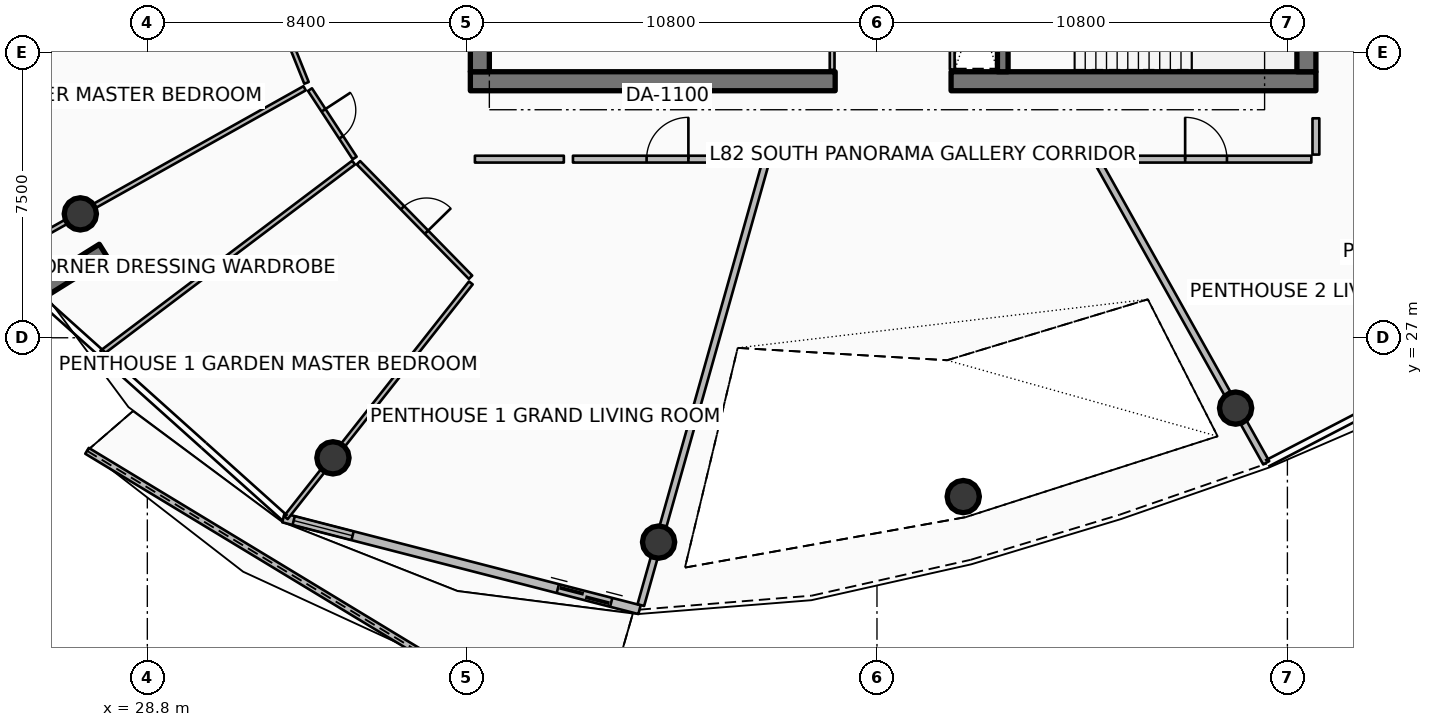
"""IFC4 building model, lengths in metres.
Left out: names, types, materials, properties, quantities, classifications, styles, units other than length and angle.
Written with IfcOpenShell. Run it as: python <this file> out.ifc"""

import sys

from ifc_helpers import new_model, si_unit, direction, frame, frame_2d, origin, origin_2d, place, context, subcontext, project, spatial, polyline, rectangle, circle, outline, extrude, element, fill, save


model = new_model("IFC4")
c1 = context("Model", 3, precision=1e-05, world=origin(), true_north=direction((0.0, 1.0)))
c2 = subcontext(c1, "Body", "Model", "MODEL_VIEW")
j1 = project(units=[si_unit("LENGTHUNIT", "METRE"), si_unit("PLANEANGLEUNIT", "RADIAN")], contexts=[c1])
p1 = place(None, origin())
s1 = spatial("IfcSite", under=j1, at=p1, CompositionType="ELEMENT")
p2 = place(p1, origin())
s2 = spatial("IfcBuilding", under=s1, at=p2, CompositionType="ELEMENT")
p3 = place(p2, frame((0.0, 0.0, 326.3)))
s3 = spatial("IfcBuildingStorey", under=s2, at=p3, CompositionType="ELEMENT", Elevation=326.3)
p4 = place(p3, frame((37.3, 33.75, 0.0), z_axis=(0.0, 0.0, 1.0), x_axis=(1.0, 0.0, 0.0)))
e1 = element("IfcWall", 1, at=p4, inside=s3, PredefinedType="SHEAR", context=c2, shape_type="SweptSolid", body=[
    extrude(rectangle(XDim=9.6, YDim=0.5, at=frame_2d((4.8, 0.0))), origin(), (0.0, 0.0, 1.0), 4.2),
])
p5 = place(p3, frame((49.95, 33.75, 0.0), z_axis=(0.0, 0.0, 1.0), x_axis=(1.0, 0.0, 0.0)))
e2 = element("IfcWall", 2, at=p5, inside=s3, PredefinedType="SHEAR", context=c2, shape_type="SweptSolid", body=[
    extrude(rectangle(XDim=9.6, YDim=0.5, at=frame_2d((4.8, 0.0))), origin(), (0.0, 0.0, 1.0), 4.2),
])
for number, where, z_axis, x_axis in (
    (3, (37.55, 34.0, 0.0), (0.0, 0.0, 1.0), (0.0, 1.0, 0.0)),
    (4, (59.3, 34.0, 0.0), (0.0, 0.0, 1.0), (0.0, 1.0, 0.0)),
):
    element("IfcWall", number, at=place(p3, frame(where, z_axis=z_axis, x_axis=x_axis)), inside=s3, PredefinedType="SHEAR", context=c2, shape_type="SweptSolid", body=[
        extrude(rectangle(XDim=16.0, YDim=0.5, at=frame_2d((8.0, 0.0))), origin(), (0.0, 0.0, 1.0), 4.2),
    ])
p6 = place(p3, frame((51.31, 34.0, 0.0), z_axis=(0.0, 0.0, 1.0), x_axis=(0.0, 1.0, 0.0)))
e5 = element("IfcWall", 5, at=p6, inside=s3, PredefinedType="SHEAR", context=c2, shape_type="SweptSolid", body=[
    extrude(rectangle(XDim=3.5, YDim=0.28, at=frame_2d((1.75, 0.0))), origin(), (0.0, 0.0, 1.0), 4.2),
])
p7 = place(p3, frame((27.647, 29.282, 0.0), z_axis=(0.0, 0.0, 1.0), x_axis=(-0.848053161125, -0.529911158502, 0.0)))
e6 = element("IfcWall", 6, at=p7, inside=s3, PredefinedType="SOLIDWALL", context=c2, shape_type="SweptSolid", body=[
    extrude(rectangle(XDim=3.5, YDim=0.42, at=frame_2d((1.75, 0.0))), origin(), (0.0, 0.0, 1.0), 4.2),
])
for number, where, z_axis, x_axis in (
    (7, (27.037, 30.26, 0.0), (0.0, 0.0, 1.0), (1.0, 0.0, 0.0)),
    (8, (33.684, 23.841, 0.0), (0.0, 0.0, 1.0), (1.0, 0.0, 0.0)),
    (9, (42.253, 21.624, 0.0), (0.0, 0.0, 1.0), (1.0, 0.0, 0.0)),
):
    element("IfcColumn", number, at=place(p3, frame(where, z_axis=z_axis, x_axis=x_axis)), inside=s3, PredefinedType="COLUMN", context=c2, shape_type="SweptSolid", body=[
        extrude(circle(Radius=0.425, at=origin_2d()), origin(), (0.0, 0.0, 1.0), 3.94),
    ])
p8 = place(p3, frame((50.27, 22.821, 0.0), z_axis=(0.0, 0.0, 1.0), x_axis=(1.0, 0.0, 0.0)))
e10 = element("IfcColumn", 10, at=p8, inside=s3, PredefinedType="COLUMN", context=c2, shape_type="SweptSolid", body=[
    extrude(circle(Radius=0.425, at=origin_2d()), origin(), (0.0, 0.0, 1.0), 4.196),
])
p9 = place(p3, frame((57.437, 25.149, 0.0), z_axis=(0.0, 0.0, 1.0), x_axis=(1.0, 0.0, 0.0)))
e11 = element("IfcColumn", 11, at=p9, inside=s3, PredefinedType="COLUMN", context=c2, shape_type="SweptSolid", body=[
    extrude(circle(Radius=0.425, at=origin_2d()), origin(), (0.0, 0.0, 1.0), 3.94),
])
p10 = place(p3, frame((27.213, 24.026, 0.0), z_axis=(0.0, 0.0, 1.0), x_axis=(0.855326815189, -0.518088833327, 0.0)))
e12 = element("IfcWall", 12, at=p10, inside=s3, PredefinedType="PARAPET", context=c2, shape_type="SweptSolid", body=[
    extrude(outline(polyline([(0.0, 0.0), (10.269, 0.0), (10.269, 1.348), (5.135, 1.182), (0.0, 1.12), (0.0, 0.0)])), frame((0.0, 0.09, 0.0), z_axis=(0.0, -1.0, 0.0), x_axis=(1.0, 0.0, 0.0)), (0.0, 0.0, 1.0), 0.18),
])
p11 = place(p3, frame((32.38, 22.26, 0.0), z_axis=(0.0, 0.0, 1.0), x_axis=(0.968389062354, -0.249444630957, 0.0)))
e13 = element("IfcWall", 13, at=p11, inside=s3, PredefinedType="SOLIDWALL", context=c2, shape_type="SweptSolid", body=[
    extrude(rectangle(XDim=9.678, YDim=0.24, at=frame_2d((4.839, 0.0))), origin(), (0.0, 0.0, 1.0), 2.89),
])
p12 = place(p11, frame((7.458, 0.0, 0.0)))
e14 = element("IfcOpeningElement", 14, at=p12, cuts=e13, PredefinedType="OPENING", context=c2, shape_type="SweptSolid", body=[
    extrude(rectangle(XDim=1.45, YDim=2.15, at=frame_2d((0.725, 1.075))), frame((0.0, 0.13, 0.0), z_axis=(0.0, -1.0, 0.0), x_axis=(1.0, 0.0, 0.0)), (0.0, 0.0, 1.0), 0.26),
])
p13 = place(p11, frame((0.28, 0.0, 0.65)))
e15 = element("IfcOpeningElement", 15, at=p13, cuts=e13, PredefinedType="OPENING", context=c2, shape_type="SweptSolid", body=[
    extrude(rectangle(XDim=1.6, YDim=1.5, at=frame_2d((0.8, 0.75))), frame((0.0, 0.13, 0.0), z_axis=(0.0, -1.0, 0.0), x_axis=(1.0, 0.0, 0.0)), (0.0, 0.0, 1.0), 0.26),
])
p14 = place(p3, frame((46.82, 34.05, 0.0), z_axis=(0.0, 0.0, 1.0), x_axis=(0.0, 1.0, 0.0)))
e16 = element("IfcWall", 16, at=p14, inside=s3, PredefinedType="PARTITIONING", context=c2, shape_type="SweptSolid", body=[
    extrude(rectangle(XDim=2.03, YDim=0.125, at=frame_2d((1.015, 0.0))), origin(), (0.0, 0.0, 1.0), 3.38),
])
p15 = place(p3, frame((49.98, 34.06, 0.0), z_axis=(0.0, 0.0, 1.0), x_axis=(0.0, 1.0, 0.0)))
e17 = element("IfcWall", 17, at=p15, inside=s3, PredefinedType="PARTITIONING", context=c2, shape_type="SweptSolid", body=[
    extrude(rectangle(XDim=3.4, YDim=0.125, at=frame_2d((1.7, 0.0))), origin(), (0.0, 0.0, 1.0), 3.38),
])
p16 = place(p3, frame((45.165, 31.7, 0.0), z_axis=(0.0, 0.0, 1.0), x_axis=(1.0, 0.0, 0.0)))
e18 = element("IfcWall", 18, at=p16, inside=s3, PredefinedType="SOLIDWALL", context=c2, shape_type="SweptSolid", body=[
    extrude(rectangle(XDim=8.533, YDim=0.24, at=frame_2d((4.267, 0.0))), origin(), (0.0, 0.0, 1.0), 3.38),
])
p17 = place(p3, frame((45.095, 31.7, 0.0), z_axis=(0.0, 0.0, 1.0), x_axis=(-0.271453030279, -0.962451688321, 0.0)))
e19 = element("IfcWall", 19, at=p17, inside=s3, PredefinedType="PARTITIONING", context=c2, shape_type="SweptSolid", body=[
    extrude(rectangle(XDim=12.191, YDim=0.18, at=frame_2d((6.096, 0.0))), origin(), (0.0, 0.0, 1.0), 3.38),
])
p18 = place(p3, frame((53.768, 31.7, 0.0), z_axis=(0.0, 0.0, 1.0), x_axis=(0.488623665245, -0.872494649704, 0.0)))
e20 = element("IfcWall", 20, at=p18, inside=s3, PredefinedType="PARTITIONING", context=c2, shape_type="SweptSolid", body=[
    extrude(rectangle(XDim=9.157, YDim=0.18, at=frame_2d((4.579, 0.0))), origin(), (0.0, 0.0, 1.0), 3.38),
])
p19 = place(p3, frame((40.0, 31.7, 0.0), z_axis=(0.0, 0.0, 1.0), x_axis=(1.0, 0.0, 0.0)))
e21 = element("IfcWall", 21, at=p19, inside=s3, PredefinedType="PARTITIONING", context=c2, shape_type="SweptSolid", body=[
    extrude(rectangle(XDim=4.975, YDim=0.18, at=frame_2d((2.488, 0.0))), origin(), (0.0, 0.0, 1.0), 3.38),
])
p20 = place(p19, frame((1.938, 0.0, 0.0)))
e22 = element("IfcOpeningElement", 22, at=p20, cuts=e21, PredefinedType="OPENING", context=c2, shape_type="SweptSolid", body=[
    extrude(rectangle(XDim=1.1, YDim=2.1, at=frame_2d((0.55, 1.05))), frame((0.0, 0.1, 0.0), z_axis=(0.0, -1.0, 0.0), x_axis=(1.0, 0.0, 0.0)), (0.0, 0.0, 1.0), 0.2),
])
p21 = place(p3, frame((31.416, 37.618, 0.0), z_axis=(0.0, 0.0, 1.0), x_axis=(0.37287786912, -0.927880431263, 0.0)))
e23 = element("IfcWall", 23, at=p21, inside=s3, PredefinedType="PARTITIONING", context=c2, shape_type="SweptSolid", body=[
    extrude(rectangle(XDim=4.216, YDim=0.125, at=frame_2d((2.108, 0.0))), origin(), (0.0, 0.0, 1.0), 3.38),
])
p22 = place(p21, frame((1.658, 0.0, 0.0)))
e24 = element("IfcOpeningElement", 24, at=p22, cuts=e23, PredefinedType="OPENING", context=c2, shape_type="SweptSolid", body=[
    extrude(rectangle(XDim=0.9, YDim=2.08, at=frame_2d((0.45, 1.04))), frame((0.0, 0.073, 0.0), z_axis=(0.0, -1.0, 0.0), x_axis=(1.0, 0.0, 0.0)), (0.0, 0.0, 1.0), 0.145),
])
p23 = place(p3, frame((37.42, 31.7, 0.0), z_axis=(0.0, 0.0, 1.0), x_axis=(1.0, 0.0, 0.0)))
e25 = element("IfcWall", 25, at=p23, inside=s3, PredefinedType="PARTITIONING", context=c2, shape_type="SweptSolid", body=[
    extrude(rectangle(XDim=2.34, YDim=0.18, at=frame_2d((1.17, 0.0))), origin(), (0.0, 0.0, 1.0), 3.38),
])
p24 = place(p3, frame((32.938, 33.565, 0.0), z_axis=(0.0, 0.0, 1.0), x_axis=(-0.87250261652, -0.488609439293, 0.0)))
e26 = element("IfcWall", 26, at=p24, inside=s3, PredefinedType="PARTITIONING", context=c2, shape_type="SweptSolid", body=[
    extrude(rectangle(XDim=8.573, YDim=0.125, at=frame_2d((4.286, 0.0))), origin(), (0.0, 0.0, 1.0), 3.38),
])
p25 = place(p3, frame((37.312, 28.443, 0.0), z_axis=(0.0, 0.0, 1.0), x_axis=(-0.619079427556, -0.78532837869, 0.0)))
e27 = element("IfcWall", 27, at=p25, inside=s3, PredefinedType="PARTITIONING", context=c2, shape_type="SweptSolid", body=[
    extrude(rectangle(XDim=7.864, YDim=0.125, at=frame_2d((3.932, 0.0))), origin(), (0.0, 0.0, 1.0), 3.38),
])
p26 = place(p3, frame((34.228, 31.608, 0.0), z_axis=(0.0, 0.0, 1.0), x_axis=(-0.798277484709, -0.602289845014, 0.0)))
e28 = element("IfcWall", 28, at=p26, inside=s3, PredefinedType="PARTITIONING", context=c2, shape_type="SweptSolid", body=[
    extrude(rectangle(XDim=8.299, YDim=0.125, at=frame_2d((4.149, 0.0))), origin(), (0.0, 0.0, 1.0), 3.38),
])
p27 = place(p3, frame((33.08, 33.53, 0.0), z_axis=(0.0, 0.0, 1.0), x_axis=(0.546735291737, -0.837305512205, 0.0)))
e29 = element("IfcWall", 29, at=p27, inside=s3, PredefinedType="PARTITIONING", context=c2, shape_type="SweptSolid", body=[
    extrude(rectangle(XDim=2.15, YDim=0.125, at=frame_2d((1.075, 0.0))), origin(), (0.0, 0.0, 1.0), 3.38),
])
p28 = place(p27, frame((0.65, 0.0, 0.0)))
e30 = element("IfcOpeningElement", 30, at=p28, cuts=e29, PredefinedType="OPENING", context=c2, shape_type="SweptSolid", body=[
    extrude(rectangle(XDim=0.85, YDim=2.06, at=frame_2d((0.425, 1.03))), frame((0.0, 0.073, 0.0), z_axis=(0.0, -1.0, 0.0), x_axis=(1.0, 0.0, 0.0)), (0.0, 0.0, 1.0), 0.145),
])
p29 = place(p3, frame((34.355, 31.605, 0.0), z_axis=(0.0, 0.0, 1.0), x_axis=(0.699567507915, -0.714566513258, 0.0)))
e31 = element("IfcWall", 31, at=p29, inside=s3, PredefinedType="PARTITIONING", context=c2, shape_type="SweptSolid", body=[
    extrude(rectangle(XDim=4.216, YDim=0.125, at=frame_2d((2.108, 0.0))), origin(), (0.0, 0.0, 1.0), 3.38),
])
p30 = place(p29, frame((1.658, 0.0, 0.0)))
e32 = element("IfcOpeningElement", 32, at=p30, cuts=e31, PredefinedType="OPENING", context=c2, shape_type="SweptSolid", body=[
    extrude(rectangle(XDim=0.9, YDim=2.08, at=frame_2d((0.45, 1.04))), frame((0.0, 0.073, 0.0), z_axis=(0.0, -1.0, 0.0), x_axis=(1.0, 0.0, 0.0)), (0.0, 0.0, 1.0), 0.145),
])
p31 = place(p3, frame((53.888, 31.7, 0.0), z_axis=(0.0, 0.0, 1.0), x_axis=(1.0, 0.0, 0.0)))
e33 = element("IfcWall", 33, at=p31, inside=s3, PredefinedType="PARTITIONING", context=c2, shape_type="SweptSolid", body=[
    extrude(rectangle(XDim=5.542, YDim=0.18, at=frame_2d((2.771, 0.0))), origin(), (0.0, 0.0, 1.0), 3.38),
])
p32 = place(p31, frame((2.221, 0.0, 0.0)))
e34 = element("IfcOpeningElement", 34, at=p32, cuts=e33, PredefinedType="OPENING", context=c2, shape_type="SweptSolid", body=[
    extrude(rectangle(XDim=1.1, YDim=2.1, at=frame_2d((0.55, 1.05))), frame((0.0, 0.1, 0.0), z_axis=(0.0, -1.0, 0.0), x_axis=(1.0, 0.0, 0.0)), (0.0, 0.0, 1.0), 0.2),
])
p33 = place(p3, frame((59.55, 31.82, 0.0), z_axis=(0.0, 0.0, 1.0), x_axis=(0.0, 1.0, 0.0)))
e35 = element("IfcWall", 35, at=p33, inside=s3, PredefinedType="PARTITIONING", context=c2, shape_type="SweptSolid", body=[
    extrude(rectangle(XDim=0.955, YDim=0.18, at=frame_2d((0.477, 0.0))), origin(), (0.0, 0.0, 1.0), 3.38),
])
p34 = place(p12, origin())
e36 = element("IfcDoor", 36, at=p34, inside=s3, OperationType="DOUBLE_DOOR_SLIDING", PredefinedType="DOOR", context=c2, shape_type="SweptSolid", body=[
    extrude(rectangle(XDim=1.45, YDim=2.15, at=frame_2d((0.725, 1.075))), frame((0.0, 0.025, 0.0), z_axis=(0.0, -1.0, 0.0), x_axis=(1.0, 0.0, 0.0)), (0.0, 0.0, 1.0), 0.05),
])
fill(e14, e36)
p35 = place(p13, origin())
e37 = element("IfcWindow", 37, at=p35, inside=s3, PartitioningType="SINGLE_PANEL", PredefinedType="WINDOW", context=c2, shape_type="SweptSolid", body=[
    extrude(rectangle(XDim=1.6, YDim=1.5, at=frame_2d((0.8, 0.75))), frame((0.0, 0.03, 0.0), z_axis=(0.0, -1.0, 0.0), x_axis=(1.0, 0.0, 0.0)), (0.0, 0.0, 1.0), 0.06),
])
fill(e15, e37)
p36 = place(p20, origin())
e38 = element("IfcDoor", 38, at=p36, inside=s3, OperationType="SINGLE_SWING_RIGHT", PredefinedType="DOOR", context=c2, shape_type="SweptSolid", body=[
    extrude(rectangle(XDim=1.1, YDim=2.1, at=frame_2d((0.55, 1.05))), frame((0.0, 0.025, 0.0), z_axis=(0.0, -1.0, 0.0), x_axis=(1.0, 0.0, 0.0)), (0.0, 0.0, 1.0), 0.05),
])
fill(e22, e38)
p37 = place(p28, origin())
e39 = element("IfcDoor", 39, at=p37, inside=s3, OperationType="SINGLE_SWING_LEFT", PredefinedType="DOOR", context=c2, shape_type="SweptSolid", body=[
    extrude(rectangle(XDim=0.85, YDim=2.06, at=frame_2d((0.425, 1.03))), frame((0.0, 0.025, 0.0), z_axis=(0.0, -1.0, 0.0), x_axis=(1.0, 0.0, 0.0)), (0.0, 0.0, 1.0), 0.05),
])
fill(e30, e39)
p38 = place(p30, origin())
e40 = element("IfcDoor", 40, at=p38, inside=s3, OperationType="SINGLE_SWING_RIGHT", PredefinedType="DOOR", context=c2, shape_type="SweptSolid", body=[
    extrude(rectangle(XDim=0.9, YDim=2.08, at=frame_2d((0.45, 1.04))), frame((0.0, 0.025, 0.0), z_axis=(0.0, -1.0, 0.0), x_axis=(1.0, 0.0, 0.0)), (0.0, 0.0, 1.0), 0.05),
])
fill(e32, e40)
p39 = place(p32, origin())
e41 = element("IfcDoor", 41, at=p39, inside=s3, OperationType="SINGLE_SWING_LEFT", PredefinedType="DOOR", context=c2, shape_type="SweptSolid", body=[
    extrude(rectangle(XDim=1.1, YDim=2.1, at=frame_2d((0.55, 1.05))), frame((0.0, 0.025, 0.0), z_axis=(0.0, -1.0, 0.0), x_axis=(1.0, 0.0, 0.0)), (0.0, 0.0, 1.0), 0.05),
])
fill(e34, e41)
save(model, sys.argv[1])
